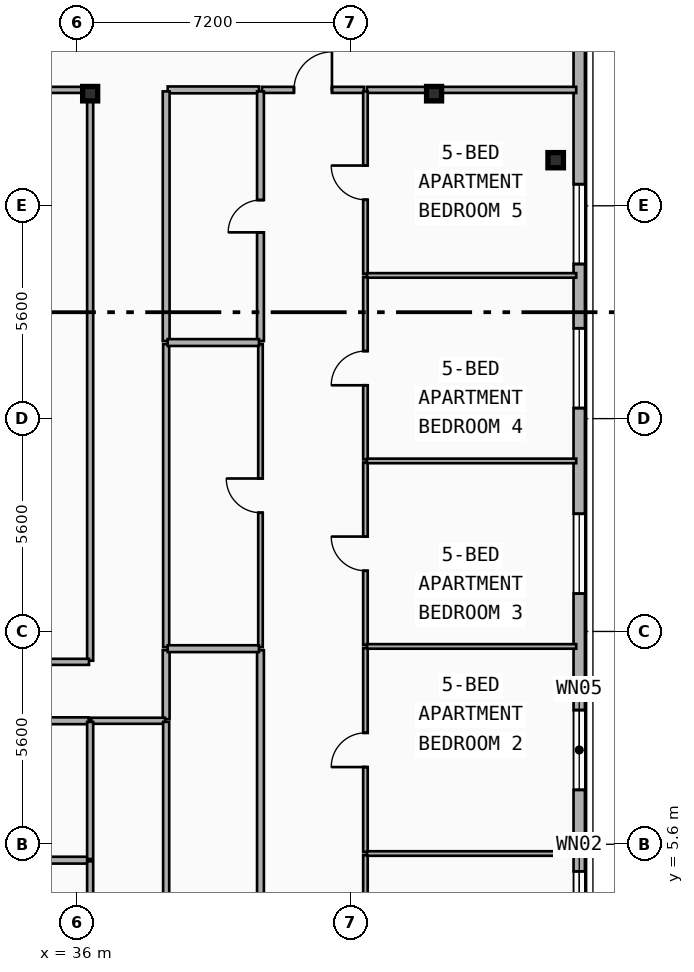
"""IFC4 building model, lengths in metres.
Left out: names, types, materials, properties, quantities, classifications, styles, units other than length and angle.
Written with IfcOpenShell. Run it as: python <this file> out.ifc"""

import sys

from ifc_helpers import new_model, si_unit, direction, frame, frame_2d, origin, origin_2d, place, context, subcontext, project, spatial, rectangle, i_section, extrude, element, fill, save


model = new_model("IFC4")
c1 = context("Model", 3, precision=1e-05, world=origin(), true_north=direction((0.0, 1.0)))
c2 = subcontext(c1, "Body", "Model", "MODEL_VIEW")
j1 = project(units=[si_unit("LENGTHUNIT", "METRE"), si_unit("PLANEANGLEUNIT", "RADIAN")], contexts=[c1])
p1 = place(None, origin())
s1 = spatial("IfcSite", under=j1, at=p1, CompositionType="ELEMENT")
p2 = place(p1, origin())
s2 = spatial("IfcBuilding", under=s1, at=p2, CompositionType="ELEMENT")
p3 = place(p2, frame((0.0, 0.0, 247.3)))
s3 = spatial("IfcBuildingStorey", under=s2, at=p3, CompositionType="ELEMENT", Elevation=247.3)
for number, where, z_axis, x_axis in (
    (1, (36.35, 25.35, 0.0), (0.0, 0.0, 1.0), (1.0, 0.0, 0.0)),
    (2, (45.4, 25.35, 0.0), (0.0, 0.0, 1.0), (1.0, 0.0, 0.0)),
):
    element("IfcColumn", number, at=place(p3, frame(where, z_axis=z_axis, x_axis=x_axis)), inside=s3, PredefinedType="COLUMN", context=c2, shape_type="SweptSolid", body=[
        extrude(i_section(OverallWidth=0.395, OverallDepth=0.38, WebThickness=0.019, FlangeThickness=0.03, FilletRadius=0.015, at=origin_2d()), origin(), (0.0, 0.0, 1.0), 3.7),
    ])
p4 = place(p3, frame((48.6, 23.6, 0.0), z_axis=(0.0, 0.0, 1.0), x_axis=(1.0, 0.0, 0.0)))
e3 = element("IfcColumn", 3, at=p4, inside=s3, PredefinedType="COLUMN", context=c2, shape_type="SweptSolid", body=[
    extrude(i_section(OverallWidth=0.408, OverallDepth=0.4, WebThickness=0.025, FlangeThickness=0.039, FilletRadius=0.015, at=origin_2d()), origin(), (0.0, 0.0, 1.0), 3.7),
])
p5 = place(p3, frame((49.22, 36.8, 0.0), z_axis=(0.0, 0.0, 1.0), x_axis=(0.0, -1.0, 0.0)))
e4 = element("IfcWall", 4, at=p5, inside=s3, PredefinedType="SOLIDWALL", context=c2, shape_type="SweptSolid", body=[
    extrude(rectangle(XDim=34.2, YDim=0.3, at=frame_2d((17.1, 0.0))), origin(), (0.0, 0.0, 1.0), 3.42),
])
p6 = place(p5, frame((31.912, 0.0, 0.8)))
e5 = element("IfcOpeningElement", 5, at=p6, cuts=e4, PredefinedType="OPENING", context=c2, shape_type="SweptSolid", body=[
    extrude(rectangle(XDim=1.8, YDim=1.8, at=frame_2d((0.9, 0.9))), frame((0.0, 0.16, 0.0), z_axis=(0.0, -1.0, 0.0), x_axis=(1.0, 0.0, 0.0)), (0.0, 0.0, 1.0), 0.32),
])
p7 = place(p5, frame((27.668, 0.0, 0.75)))
e6 = element("IfcOpeningElement", 6, at=p7, cuts=e4, PredefinedType="OPENING", context=c2, shape_type="SweptSolid", body=[
    extrude(rectangle(XDim=2.1, YDim=2.1, at=frame_2d((1.05, 1.05))), frame((0.0, 0.16, 0.0), z_axis=(0.0, -1.0, 0.0), x_axis=(1.0, 0.0, 0.0)), (0.0, 0.0, 1.0), 0.32),
])
p8 = place(p5, frame((22.503, 0.0, 0.75)))
e7 = element("IfcOpeningElement", 7, at=p8, cuts=e4, PredefinedType="OPENING", context=c2, shape_type="SweptSolid", body=[
    extrude(rectangle(XDim=2.1, YDim=2.1, at=frame_2d((1.05, 1.05))), frame((0.0, 0.16, 0.0), z_axis=(0.0, -1.0, 0.0), x_axis=(1.0, 0.0, 0.0)), (0.0, 0.0, 1.0), 0.32),
])
p9 = place(p5, frame((17.623, 0.0, 0.75)))
e8 = element("IfcOpeningElement", 8, at=p9, cuts=e4, PredefinedType="OPENING", context=c2, shape_type="SweptSolid", body=[
    extrude(rectangle(XDim=2.1, YDim=2.1, at=frame_2d((1.05, 1.05))), frame((0.0, 0.16, 0.0), z_axis=(0.0, -1.0, 0.0), x_axis=(1.0, 0.0, 0.0)), (0.0, 0.0, 1.0), 0.32),
])
p10 = place(p5, frame((13.832, 0.0, 0.75)))
e9 = element("IfcOpeningElement", 9, at=p10, cuts=e4, PredefinedType="OPENING", context=c2, shape_type="SweptSolid", body=[
    extrude(rectangle(XDim=2.1, YDim=2.1, at=frame_2d((1.05, 1.05))), frame((0.0, 0.16, 0.0), z_axis=(0.0, -1.0, 0.0), x_axis=(1.0, 0.0, 0.0)), (0.0, 0.0, 1.0), 0.32),
])
p11 = place(p3, frame((40.872, 25.45, 0.0), z_axis=(0.0, 0.0, 1.0), x_axis=(1.0, 0.0, 0.0)))
e10 = element("IfcWall", 10, at=p11, inside=s3, PredefinedType="PARTITIONING", context=c2, shape_type="SweptSolid", body=[
    extrude(rectangle(XDim=2.682, YDim=0.16, at=frame_2d((1.341, 0.0))), origin(), (0.0, 0.0, 1.0), 3.42),
])
p12 = place(p11, frame((0.841, 0.0, 0.0)))
e11 = element("IfcOpeningElement", 11, at=p12, cuts=e10, PredefinedType="OPENING", context=c2, shape_type="SweptSolid", body=[
    extrude(rectangle(XDim=1.0, YDim=2.15, at=frame_2d((0.5, 1.075))), frame((0.0, 0.09, 0.0), z_axis=(0.0, -1.0, 0.0), x_axis=(1.0, 0.0, 0.0)), (0.0, 0.0, 1.0), 0.18),
])
p13 = place(p3, frame((38.39, 25.45, 0.0), z_axis=(0.0, 0.0, 1.0), x_axis=(1.0, 0.0, 0.0)))
e12 = element("IfcWall", 12, at=p13, inside=s3, PredefinedType="PLUMBINGWALL", context=c2, shape_type="SweptSolid", body=[
    extrude(rectangle(XDim=2.402, YDim=0.18, at=frame_2d((1.201, 0.0))), origin(), (0.0, 0.0, 1.0), 3.42),
])
p14 = place(p3, frame((43.634, 25.45, 0.0), z_axis=(0.0, 0.0, 1.0), x_axis=(1.0, 0.0, 0.0)))
e13 = element("IfcWall", 13, at=p14, inside=s3, PredefinedType="PARTITIONING", context=c2, shape_type="SweptSolid", body=[
    extrude(rectangle(XDim=5.506, YDim=0.16, at=frame_2d((2.753, 0.0))), origin(), (0.0, 0.0, 1.0), 2.7),
])
p15 = place(p3, frame((38.35, 8.89, 0.0), z_axis=(0.0, 0.0, 1.0), x_axis=(0.0, 1.0, 0.0)))
e14 = element("IfcWall", 14, at=p15, inside=s3, PredefinedType="PLUMBINGWALL", context=c2, shape_type="SweptSolid", body=[
    extrude(rectangle(XDim=1.817, YDim=0.18, at=frame_2d((0.909, 0.0))), origin(), (0.0, 0.0, 1.0), 3.42),
])
p16 = place(p3, frame((38.35, 10.787, 0.0), z_axis=(0.0, 0.0, 1.0), x_axis=(0.0, 1.0, 0.0)))
e15 = element("IfcWall", 15, at=p16, inside=s3, PredefinedType="PARTITIONING", context=c2, shape_type="SweptSolid", body=[
    extrude(rectangle(XDim=7.975, YDim=0.16, at=frame_2d((3.987, 0.0))), origin(), (0.0, 0.0, 1.0), 2.9),
])
p17 = place(p3, frame((38.35, 18.842, 0.0), z_axis=(0.0, 0.0, 1.0), x_axis=(0.0, 1.0, 0.0)))
e16 = element("IfcWall", 16, at=p17, inside=s3, PredefinedType="PLUMBINGWALL", context=c2, shape_type="SweptSolid", body=[
    extrude(rectangle(XDim=6.568, YDim=0.18, at=frame_2d((3.284, 0.0))), origin(), (0.0, 0.0, 1.0), 2.9),
])
for number, where, z_axis, x_axis in (
    (17, (34.415, 8.85, 0.0), (0.0, 0.0, 1.0), (1.0, 0.0, 0.0)),
    (18, (34.415, 5.182, 0.0), (0.0, 0.0, 1.0), (1.0, 0.0, 0.0)),
):
    element("IfcWall", number, at=place(p3, frame(where, z_axis=z_axis, x_axis=x_axis)), inside=s3, PredefinedType="PLUMBINGWALL", context=c2, shape_type="SweptSolid", body=[
        extrude(rectangle(XDim=1.895, YDim=0.18, at=frame_2d((0.948, 0.0))), origin(), (0.0, 0.0, 1.0), 2.7),
    ])
p18 = place(p3, frame((40.832, -1.34, 0.0), z_axis=(0.0, 0.0, 1.0), x_axis=(0.0, 1.0, 0.0)))
e19 = element("IfcWall", 19, at=p18, inside=s3, PredefinedType="PLUMBINGWALL", context=c2, shape_type="SweptSolid", body=[
    extrude(rectangle(XDim=12.047, YDim=0.18, at=frame_2d((6.023, 0.0))), origin(), (0.0, 0.0, 1.0), 3.05),
])
p19 = place(p18, frame((0.589, 0.0, 0.0)))
e20 = element("IfcOpeningElement", 20, at=p19, cuts=e19, PredefinedType="OPENING", context=c2, shape_type="SweptSolid", body=[
    extrude(rectangle(XDim=1.0, YDim=2.15, at=frame_2d((0.5, 1.075))), frame((0.0, 0.1, 0.0), z_axis=(0.0, -1.0, 0.0), x_axis=(1.0, 0.0, 0.0)), (0.0, 0.0, 1.0), 0.2),
])
p20 = place(p3, frame((40.832, 10.787, 0.0), z_axis=(0.0, 0.0, 1.0), x_axis=(0.0, 1.0, 0.0)))
e21 = element("IfcWall", 21, at=p20, inside=s3, PredefinedType="PARTITIONING", context=c2, shape_type="SweptSolid", body=[
    extrude(rectangle(XDim=7.975, YDim=0.12, at=frame_2d((3.987, 0.0))), origin(), (0.0, 0.0, 1.0), 2.9),
])
p21 = place(p20, frame((3.538, 0.0, 0.0)))
e22 = element("IfcOpeningElement", 22, at=p21, cuts=e21, PredefinedType="OPENING", context=c2, shape_type="SweptSolid", body=[
    extrude(rectangle(XDim=0.9, YDim=2.1, at=frame_2d((0.45, 1.05))), frame((0.0, 0.07, 0.0), z_axis=(0.0, -1.0, 0.0), x_axis=(1.0, 0.0, 0.0)), (0.0, 0.0, 1.0), 0.14),
])
p22 = place(p3, frame((40.832, 18.842, 0.0), z_axis=(0.0, 0.0, 1.0), x_axis=(0.0, 1.0, 0.0)))
e23 = element("IfcWall", 23, at=p22, inside=s3, PredefinedType="PLUMBINGWALL", context=c2, shape_type="SweptSolid", body=[
    extrude(rectangle(XDim=6.568, YDim=0.18, at=frame_2d((3.284, 0.0))), origin(), (0.0, 0.0, 1.0), 2.9),
])
p23 = place(p22, frame((2.859, 0.0, 0.0)))
e24 = element("IfcOpeningElement", 24, at=p23, cuts=e23, PredefinedType="OPENING", context=c2, shape_type="SweptSolid", body=[
    extrude(rectangle(XDim=0.85, YDim=2.1, at=frame_2d((0.425, 1.05))), frame((0.0, 0.1, 0.0), z_axis=(0.0, -1.0, 0.0), x_axis=(1.0, 0.0, 0.0)), (0.0, 0.0, 1.0), 0.2),
])
p24 = place(p3, frame((43.594, -1.34, 0.0), z_axis=(0.0, 0.0, 1.0), x_axis=(0.0, 1.0, 0.0)))
e25 = element("IfcWall", 25, at=p24, inside=s3, PredefinedType="PARTITIONING", context=c2, shape_type="SweptSolid", body=[
    extrude(rectangle(XDim=6.657, YDim=0.12, at=frame_2d((3.329, 0.0))), origin(), (0.0, 0.0, 1.0), 3.08),
])
p25 = place(p24, frame((2.878, 0.0, 0.0)))
e26 = element("IfcOpeningElement", 26, at=p25, cuts=e25, PredefinedType="OPENING", context=c2, shape_type="SweptSolid", body=[
    extrude(rectangle(XDim=0.9, YDim=2.1, at=frame_2d((0.45, 1.05))), frame((0.0, 0.07, 0.0), z_axis=(0.0, -1.0, 0.0), x_axis=(1.0, 0.0, 0.0)), (0.0, 0.0, 1.0), 0.14),
])
p26 = place(p3, frame((43.594, 5.397, 0.0), z_axis=(0.0, 0.0, 1.0), x_axis=(0.0, 1.0, 0.0)))
e27 = element("IfcWall", 27, at=p26, inside=s3, PredefinedType="PARTITIONING", context=c2, shape_type="SweptSolid", body=[
    extrude(rectangle(XDim=5.369, YDim=0.12, at=frame_2d((2.685, 0.0))), origin(), (0.0, 0.0, 1.0), 3.05),
])
p27 = place(p26, frame((2.235, 0.0, 0.0)))
e28 = element("IfcOpeningElement", 28, at=p27, cuts=e27, PredefinedType="OPENING", context=c2, shape_type="SweptSolid", body=[
    extrude(rectangle(XDim=0.9, YDim=2.1, at=frame_2d((0.45, 1.05))), frame((0.0, 0.07, 0.0), z_axis=(0.0, -1.0, 0.0), x_axis=(1.0, 0.0, 0.0)), (0.0, 0.0, 1.0), 0.14),
])
p28 = place(p3, frame((43.594, 10.846, 0.0), z_axis=(0.0, 0.0, 1.0), x_axis=(0.0, 1.0, 0.0)))
e29 = element("IfcWall", 29, at=p28, inside=s3, PredefinedType="PARTITIONING", context=c2, shape_type="SweptSolid", body=[
    extrude(rectangle(XDim=4.801, YDim=0.12, at=frame_2d((2.4, 0.0))), origin(), (0.0, 0.0, 1.0), 2.9),
])
p29 = place(p28, frame((1.95, 0.0, 0.0)))
e30 = element("IfcOpeningElement", 30, at=p29, cuts=e29, PredefinedType="OPENING", context=c2, shape_type="SweptSolid", body=[
    extrude(rectangle(XDim=0.9, YDim=2.1, at=frame_2d((0.45, 1.05))), frame((0.0, 0.07, 0.0), z_axis=(0.0, -1.0, 0.0), x_axis=(1.0, 0.0, 0.0)), (0.0, 0.0, 1.0), 0.14),
])
p30 = place(p3, frame((43.594, 15.727, 0.0), z_axis=(0.0, 0.0, 1.0), x_axis=(0.0, 1.0, 0.0)))
e31 = element("IfcWall", 31, at=p30, inside=s3, PredefinedType="PARTITIONING", context=c2, shape_type="SweptSolid", body=[
    extrude(rectangle(XDim=4.801, YDim=0.12, at=frame_2d((2.4, 0.0))), origin(), (0.0, 0.0, 1.0), 2.9),
])
p31 = place(p30, frame((1.95, 0.0, 0.0)))
e32 = element("IfcOpeningElement", 32, at=p31, cuts=e31, PredefinedType="OPENING", context=c2, shape_type="SweptSolid", body=[
    extrude(rectangle(XDim=0.9, YDim=2.1, at=frame_2d((0.45, 1.05))), frame((0.0, 0.07, 0.0), z_axis=(0.0, -1.0, 0.0), x_axis=(1.0, 0.0, 0.0)), (0.0, 0.0, 1.0), 0.14),
])
p32 = place(p3, frame((43.594, 20.608, 0.0), z_axis=(0.0, 0.0, 1.0), x_axis=(0.0, 1.0, 0.0)))
e33 = element("IfcWall", 33, at=p32, inside=s3, PredefinedType="PARTITIONING", context=c2, shape_type="SweptSolid", body=[
    extrude(rectangle(XDim=4.802, YDim=0.12, at=frame_2d((2.401, 0.0))), origin(), (0.0, 0.0, 1.0), 3.05),
])
p33 = place(p32, frame((1.951, 0.0, 0.0)))
e34 = element("IfcOpeningElement", 34, at=p33, cuts=e33, PredefinedType="OPENING", context=c2, shape_type="SweptSolid", body=[
    extrude(rectangle(XDim=0.9, YDim=2.1, at=frame_2d((0.45, 1.05))), frame((0.0, 0.07, 0.0), z_axis=(0.0, -1.0, 0.0), x_axis=(1.0, 0.0, 0.0)), (0.0, 0.0, 1.0), 0.14),
])
p34 = place(p3, frame((38.39, 10.747, 0.0), z_axis=(0.0, 0.0, 1.0), x_axis=(1.0, 0.0, 0.0)))
e35 = element("IfcWall", 35, at=p34, inside=s3, PredefinedType="PLUMBINGWALL", context=c2, shape_type="SweptSolid", body=[
    extrude(rectangle(XDim=2.402, YDim=0.18, at=frame_2d((1.201, 0.0))), origin(), (0.0, 0.0, 1.0), 3.42),
])
p35 = place(p3, frame((38.39, 18.802, 0.0), z_axis=(0.0, 0.0, 1.0), x_axis=(1.0, 0.0, 0.0)))
e36 = element("IfcWall", 36, at=p35, inside=s3, PredefinedType="PLUMBINGWALL", context=c2, shape_type="SweptSolid", body=[
    extrude(rectangle(XDim=2.402, YDim=0.18, at=frame_2d((1.201, 0.0))), origin(), (0.0, 0.0, 1.0), 2.9),
])
for number, where, z_axis, x_axis in (
    (37, (43.634, 5.357, 0.0), (0.0, 0.0, 1.0), (1.0, 0.0, 0.0)),
    (38, (43.634, 10.806, 0.0), (0.0, 0.0, 1.0), (1.0, 0.0, 0.0)),
    (39, (43.634, 15.687, 0.0), (0.0, 0.0, 1.0), (1.0, 0.0, 0.0)),
    (40, (43.634, 20.568, 0.0), (0.0, 0.0, 1.0), (1.0, 0.0, 0.0)),
):
    element("IfcWall", number, at=place(p3, frame(where, z_axis=z_axis, x_axis=x_axis)), inside=s3, PredefinedType="PARTITIONING", context=c2, shape_type="SweptSolid", body=[
        extrude(rectangle(XDim=5.506, YDim=0.12, at=frame_2d((2.753, 0.0))), origin(), (0.0, 0.0, 1.0), 2.7),
    ])
p36 = place(p3, frame((20.48, 25.45, 0.0), z_axis=(0.0, 0.0, 1.0), x_axis=(1.0, 0.0, 0.0)))
e41 = element("IfcWall", 41, at=p36, inside=s3, PredefinedType="PARTITIONING", context=c2, shape_type="SweptSolid", body=[
    extrude(rectangle(XDim=15.84, YDim=0.16, at=frame_2d((7.92, 0.0))), origin(), (0.0, 0.0, 1.0), 2.7),
])
p37 = place(p3, frame((36.38, 8.85, 0.0), z_axis=(0.0, 0.0, 1.0), x_axis=(1.0, 0.0, 0.0)))
e42 = element("IfcWall", 42, at=p37, inside=s3, PredefinedType="PARTITIONING", context=c2, shape_type="SweptSolid", body=[
    extrude(rectangle(XDim=1.94, YDim=0.16, at=frame_2d((0.97, 0.0))), origin(), (0.0, 0.0, 1.0), 2.7),
])
p38 = place(p3, frame((36.35, 10.43, 0.0), z_axis=(0.0, 0.0, 1.0), x_axis=(0.0, 1.0, 0.0)))
e43 = element("IfcWall", 43, at=p38, inside=s3, PredefinedType="PARTITIONING", context=c2, shape_type="SweptSolid", body=[
    extrude(rectangle(XDim=14.99, YDim=0.16, at=frame_2d((7.495, 0.0))), origin(), (0.0, 0.0, 1.0), 2.7),
])
p39 = place(p3, frame((34.48, 10.4, 0.0), z_axis=(0.0, 0.0, 1.0), x_axis=(1.0, 0.0, 0.0)))
e44 = element("IfcWall", 44, at=p39, inside=s3, PredefinedType="PARTITIONING", context=c2, shape_type="SweptSolid", body=[
    extrude(rectangle(XDim=1.84, YDim=0.16, at=frame_2d((0.92, 0.0))), origin(), (0.0, 0.0, 1.0), 2.7),
])
p40 = place(p3, frame((36.35, -1.31, 0.0), z_axis=(0.0, 0.0, 1.0), x_axis=(0.0, 1.0, 0.0)))
e45 = element("IfcWall", 45, at=p40, inside=s3, PredefinedType="PARTITIONING", context=c2, shape_type="SweptSolid", body=[
    extrude(rectangle(XDim=6.462, YDim=0.16, at=frame_2d((3.231, 0.0))), origin(), (0.0, 0.0, 1.0), 2.7),
])
p41 = place(p3, frame((36.35, 5.212, 0.0), z_axis=(0.0, 0.0, 1.0), x_axis=(0.0, 1.0, 0.0)))
e46 = element("IfcWall", 46, at=p41, inside=s3, PredefinedType="PARTITIONING", context=c2, shape_type="SweptSolid", body=[
    extrude(rectangle(XDim=3.608, YDim=0.16, at=frame_2d((1.804, 0.0))), origin(), (0.0, 0.0, 1.0), 2.7),
])
p42 = place(p3, frame((38.35, -1.31, 0.0), z_axis=(0.0, 0.0, 1.0), x_axis=(0.0, 1.0, 0.0)))
e47 = element("IfcWall", 47, at=p42, inside=s3, PredefinedType="PARTITIONING", context=c2, shape_type="SweptSolid", body=[
    extrude(rectangle(XDim=10.13, YDim=0.16, at=frame_2d((5.065, 0.0))), origin(), (0.0, 0.0, 1.0), 3.05),
])
p43 = place(p6, origin())
e48 = element("IfcWindow", 48, at=p43, inside=s3, PartitioningType="SINGLE_PANEL", PredefinedType="WINDOW", context=c2, shape_type="SweptSolid", body=[
    extrude(rectangle(XDim=1.8, YDim=1.8, at=frame_2d((0.9, 0.9))), frame((0.0, 0.03, 0.0), z_axis=(0.0, -1.0, 0.0), x_axis=(1.0, 0.0, 0.0)), (0.0, 0.0, 1.0), 0.06),
])
fill(e5, e48)
p44 = place(p7, origin())
e49 = element("IfcWindow", 49, at=p44, inside=s3, PartitioningType="SINGLE_PANEL", PredefinedType="WINDOW", context=c2, shape_type="SweptSolid", body=[
    extrude(rectangle(XDim=2.1, YDim=2.1, at=frame_2d((1.05, 1.05))), frame((0.0, 0.03, 0.0), z_axis=(0.0, -1.0, 0.0), x_axis=(1.0, 0.0, 0.0)), (0.0, 0.0, 1.0), 0.06),
])
fill(e6, e49)
p45 = place(p8, origin())
e50 = element("IfcWindow", 50, at=p45, inside=s3, PartitioningType="SINGLE_PANEL", PredefinedType="WINDOW", context=c2, shape_type="SweptSolid", body=[
    extrude(rectangle(XDim=2.1, YDim=2.1, at=frame_2d((1.05, 1.05))), frame((0.0, 0.03, 0.0), z_axis=(0.0, -1.0, 0.0), x_axis=(1.0, 0.0, 0.0)), (0.0, 0.0, 1.0), 0.06),
])
fill(e7, e50)
p46 = place(p9, origin())
e51 = element("IfcWindow", 51, at=p46, inside=s3, PartitioningType="SINGLE_PANEL", PredefinedType="WINDOW", context=c2, shape_type="SweptSolid", body=[
    extrude(rectangle(XDim=2.1, YDim=2.1, at=frame_2d((1.05, 1.05))), frame((0.0, 0.03, 0.0), z_axis=(0.0, -1.0, 0.0), x_axis=(1.0, 0.0, 0.0)), (0.0, 0.0, 1.0), 0.06),
])
fill(e8, e51)
p47 = place(p10, origin())
e52 = element("IfcWindow", 52, at=p47, inside=s3, PartitioningType="SINGLE_PANEL", PredefinedType="WINDOW", context=c2, shape_type="SweptSolid", body=[
    extrude(rectangle(XDim=2.1, YDim=2.1, at=frame_2d((1.05, 1.05))), frame((0.0, 0.03, 0.0), z_axis=(0.0, -1.0, 0.0), x_axis=(1.0, 0.0, 0.0)), (0.0, 0.0, 1.0), 0.06),
])
fill(e9, e52)
p48 = place(p12, origin())
e53 = element("IfcDoor", 53, at=p48, inside=s3, OperationType="SINGLE_SWING_RIGHT", PredefinedType="DOOR", context=c2, shape_type="SweptSolid", body=[
    extrude(rectangle(XDim=1.0, YDim=2.15, at=frame_2d((0.5, 1.075))), frame((0.0, 0.025, 0.0), z_axis=(0.0, -1.0, 0.0), x_axis=(1.0, 0.0, 0.0)), (0.0, 0.0, 1.0), 0.05),
])
fill(e11, e53)
p49 = place(p21, origin())
e54 = element("IfcDoor", 54, at=p49, inside=s3, OperationType="SINGLE_SWING_RIGHT", PredefinedType="DOOR", context=c2, shape_type="SweptSolid", body=[
    extrude(rectangle(XDim=0.9, YDim=2.1, at=frame_2d((0.45, 1.05))), frame((0.0, 0.025, 0.0), z_axis=(0.0, -1.0, 0.0), x_axis=(1.0, 0.0, 0.0)), (0.0, 0.0, 1.0), 0.05),
])
fill(e22, e54)
p50 = place(p23, origin())
e55 = element("IfcDoor", 55, at=p50, inside=s3, OperationType="SINGLE_SWING_LEFT", PredefinedType="DOOR", context=c2, shape_type="SweptSolid", body=[
    extrude(rectangle(XDim=0.85, YDim=2.1, at=frame_2d((0.425, 1.05))), frame((0.0, 0.025, 0.0), z_axis=(0.0, -1.0, 0.0), x_axis=(1.0, 0.0, 0.0)), (0.0, 0.0, 1.0), 0.05),
])
fill(e24, e55)
p51 = place(p27, origin())
e56 = element("IfcDoor", 56, at=p51, inside=s3, OperationType="SINGLE_SWING_LEFT", PredefinedType="DOOR", context=c2, shape_type="SweptSolid", body=[
    extrude(rectangle(XDim=0.9, YDim=2.1, at=frame_2d((0.45, 1.05))), frame((0.0, 0.025, 0.0), z_axis=(0.0, -1.0, 0.0), x_axis=(1.0, 0.0, 0.0)), (0.0, 0.0, 1.0), 0.05),
])
fill(e28, e56)
p52 = place(p29, origin())
e57 = element("IfcDoor", 57, at=p52, inside=s3, OperationType="SINGLE_SWING_RIGHT", PredefinedType="DOOR", context=c2, shape_type="SweptSolid", body=[
    extrude(rectangle(XDim=0.9, YDim=2.1, at=frame_2d((0.45, 1.05))), frame((0.0, 0.025, 0.0), z_axis=(0.0, -1.0, 0.0), x_axis=(1.0, 0.0, 0.0)), (0.0, 0.0, 1.0), 0.05),
])
fill(e30, e57)
p53 = place(p31, origin())
e58 = element("IfcDoor", 58, at=p53, inside=s3, OperationType="SINGLE_SWING_LEFT", PredefinedType="DOOR", context=c2, shape_type="SweptSolid", body=[
    extrude(rectangle(XDim=0.9, YDim=2.1, at=frame_2d((0.45, 1.05))), frame((0.0, 0.025, 0.0), z_axis=(0.0, -1.0, 0.0), x_axis=(1.0, 0.0, 0.0)), (0.0, 0.0, 1.0), 0.05),
])
fill(e32, e58)
p54 = place(p33, origin())
e59 = element("IfcDoor", 59, at=p54, inside=s3, OperationType="SINGLE_SWING_RIGHT", PredefinedType="DOOR", context=c2, shape_type="SweptSolid", body=[
    extrude(rectangle(XDim=0.9, YDim=2.1, at=frame_2d((0.45, 1.05))), frame((0.0, 0.025, 0.0), z_axis=(0.0, -1.0, 0.0), x_axis=(1.0, 0.0, 0.0)), (0.0, 0.0, 1.0), 0.05),
])
fill(e34, e59)
save(model, sys.argv[1])
